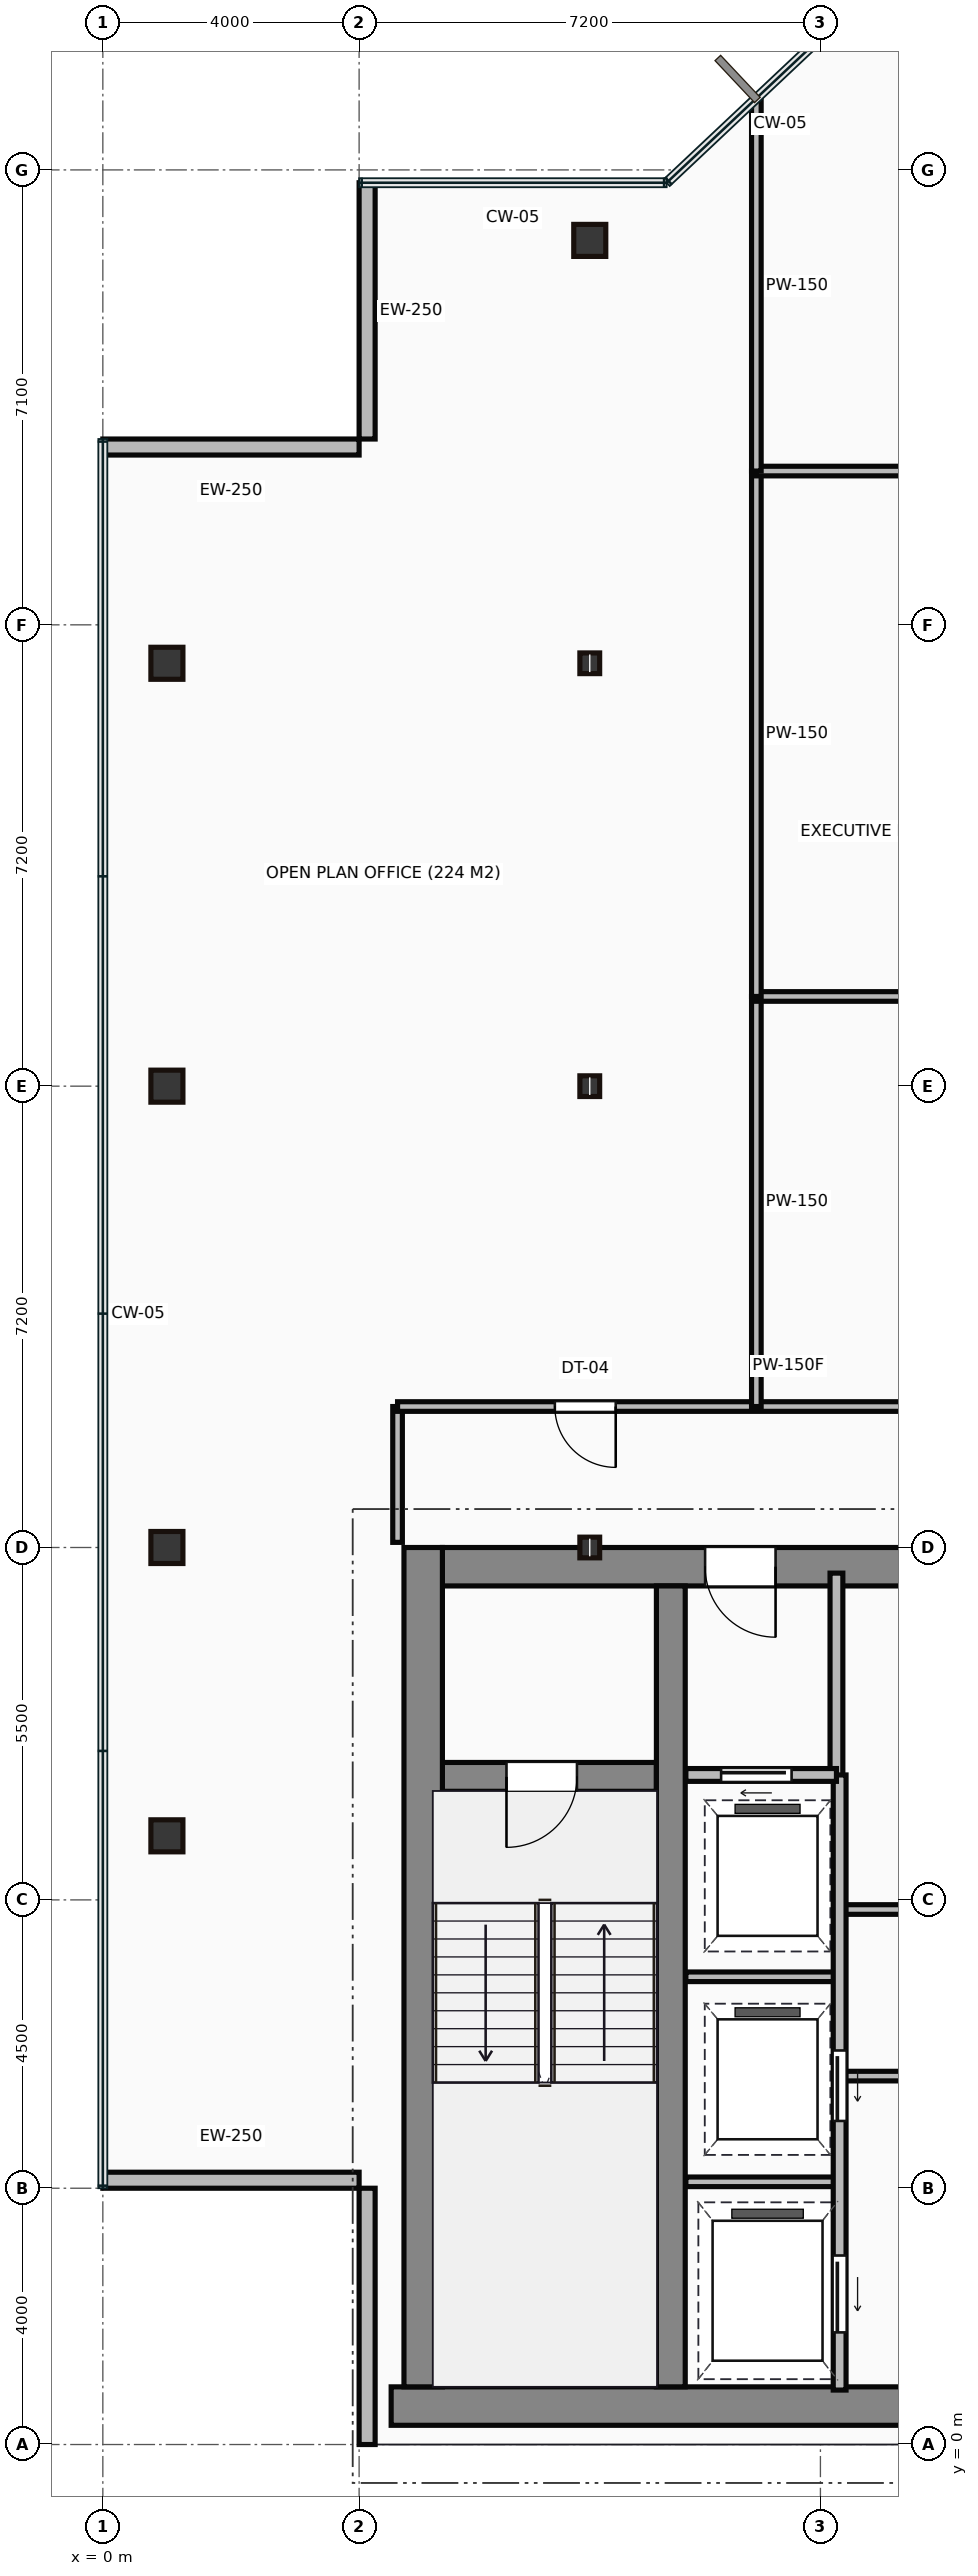
"""IFC4 building model, lengths in metres.
Left out: names, types, materials, properties, quantities, classifications, styles, units other than length and angle.
Written with IfcOpenShell. Run it as: python <this file> out.ifc"""

import sys

from ifc_helpers import new_model, si_unit, direction, frame, frame_2d, origin, origin_2d, place, context, subcontext, project, spatial, rectangle, hollow_rectangle, i_section, extrude, source, transform, mapped, element, fill, save


model = new_model("IFC4")
c1 = context("Model", 3, precision=1e-05, world=origin(), true_north=direction((0.0, 1.0)))
c2 = subcontext(c1, "Body", "Model", "MODEL_VIEW")
j1 = project(units=[si_unit("LENGTHUNIT", "METRE"), si_unit("PLANEANGLEUNIT", "RADIAN")], contexts=[c1])
p1 = place(None, origin())
s1 = spatial("IfcSite", under=j1, at=p1, CompositionType="ELEMENT")
p2 = place(p1, origin())
s2 = spatial("IfcBuilding", under=s1, at=p2, CompositionType="ELEMENT")
p3 = place(p2, frame((0.0, 0.0, 269.75)))
s3 = spatial("IfcBuildingStorey", under=s2, at=p3, CompositionType="ELEMENT", Elevation=269.75)
m1 = source(origin(), c2, "Body", "SweptSolid", [
    extrude(rectangle(XDim=29.5, YDim=0.6, at=frame_2d((14.75, 0.0))), origin(), (0.0, 0.0, 1.0), 3.65),
])
p4 = place(p3, frame((4.5, 0.6, 0.0), z_axis=(0.0, 0.0, 1.0), x_axis=(1.0, 0.0, 0.0)))
e1 = element("IfcWall", 1, at=p4, inside=s3, PredefinedType="SHEAR", context=c2, shape_type="MappedRepresentation", body=[
    mapped(m1, transform((0.0, 0.0, 0.0))),
])
m2 = source(origin(), c2, "Body", "SweptSolid", [
    extrude(rectangle(XDim=13.1, YDim=0.6, at=frame_2d((6.55, 0.0))), origin(), (0.0, 0.0, 1.0), 3.65),
])
p5 = place(p3, frame((5.0, 0.9, 0.0), z_axis=(0.0, 0.0, 1.0), x_axis=(0.0, 1.0, 0.0)))
e2 = element("IfcWall", 2, at=p5, inside=s3, PredefinedType="SHEAR", context=c2, shape_type="MappedRepresentation", body=[
    mapped(m2, transform((0.0, 0.0, 0.0))),
])
m3 = source(origin(), c2, "Body", "SweptSolid", [
    extrude(rectangle(XDim=9.1, YDim=0.6, at=frame_2d((4.55, 0.0))), origin(), (0.0, 0.0, 1.0), 3.65),
])
p6 = place(p3, frame((5.3, 13.7, 0.0), z_axis=(0.0, 0.0, 1.0), x_axis=(1.0, 0.0, 0.0)))
e3 = element("IfcWall", 3, at=p6, inside=s3, PredefinedType="SHEAR", context=c2, shape_type="MappedRepresentation", body=[
    mapped(m3, transform((0.0, 0.0, 0.0))),
])
p7 = place(p6, frame((4.1, 0.0, 0.0)))
e4 = element("IfcOpeningElement", 4, at=p7, cuts=e3, PredefinedType="OPENING", context=c2, shape_type="SweptSolid", body=[
    extrude(rectangle(XDim=1.1, YDim=2.15, at=frame_2d((0.55, 1.075))), frame((0.0, 0.31, 0.0), z_axis=(0.0, -1.0, 0.0), x_axis=(1.0, 0.0, 0.0)), (0.0, 0.0, 1.0), 0.62),
])
m4 = source(origin(), c2, "Body", "SweptSolid", [
    extrude(rectangle(XDim=12.5, YDim=0.45, at=frame_2d((6.25, 0.0))), origin(), (0.0, 0.0, 1.0), 3.65),
])
p8 = place(p3, frame((8.865, 0.9, 0.0), z_axis=(0.0, 0.0, 1.0), x_axis=(0.0, 1.0, 0.0)))
e5 = element("IfcWall", 5, at=p8, inside=s3, PredefinedType="SHEAR", context=c2, shape_type="MappedRepresentation", body=[
    mapped(m4, transform((0.0, 0.0, 0.0))),
])
m5 = source(origin(), c2, "Body", "SweptSolid", [
    extrude(rectangle(XDim=3.39, YDim=0.45, at=frame_2d((1.695, 0.0))), origin(), (0.0, 0.0, 1.0), 3.65),
])
p9 = place(p3, frame((5.25, 10.42, 0.0), z_axis=(0.0, 0.0, 1.0), x_axis=(1.0, 0.0, 0.0)))
e6 = element("IfcWall", 6, at=p9, inside=s3, PredefinedType="SHEAR", context=c2, shape_type="MappedRepresentation", body=[
    mapped(m5, transform((0.0, 0.0, 0.0))),
])
p10 = place(p9, frame((1.05, 0.0, 0.0)))
e7 = element("IfcOpeningElement", 7, at=p10, cuts=e6, PredefinedType="OPENING", context=c2, shape_type="SweptSolid", body=[
    extrude(rectangle(XDim=1.1, YDim=2.15, at=frame_2d((0.55, 1.075))), frame((0.0, 0.235, 0.0), z_axis=(0.0, -1.0, 0.0), x_axis=(1.0, 0.0, 0.0)), (0.0, 0.0, 1.0), 0.47),
])
m6 = source(origin(), c2, "Body", "SweptSolid", [
    extrude(hollow_rectangle(XDim=0.5, YDim=0.5, WallThickness=0.022, at=origin_2d()), origin(), (0.0, 0.0, 1.0), 3.65),
])
for number, where, z_axis, x_axis in (
    (8, (1.0, 9.5, 0.0), (0.0, 0.0, 1.0), (1.0, 0.0, 0.0)),
    (9, (1.0, 14.0, 0.0), (0.0, 0.0, 1.0), (1.0, 0.0, 0.0)),
    (10, (1.0, 21.2, 0.0), (0.0, 0.0, 1.0), (1.0, 0.0, 0.0)),
    (11, (1.0, 27.8, 0.0), (0.0, 0.0, 1.0), (1.0, 0.0, 0.0)),
):
    element("IfcColumn", number, at=place(p3, frame(where, z_axis=z_axis, x_axis=x_axis)), inside=s3, PredefinedType="COLUMN", context=c2, shape_type="MappedRepresentation", body=[
        mapped(m6, transform((0.0, 0.0, 0.0))),
    ])
m7 = source(origin(), c2, "Body", "SweptSolid", [
    extrude(i_section(OverallWidth=0.309, OverallDepth=0.323, WebThickness=0.014, FlangeThickness=0.023, at=origin_2d()), origin(), (0.0, 0.0, 1.0), 3.65),
])
for number, where, z_axis, x_axis in (
    (12, (7.6, 14.0, 0.0), (0.0, 0.0, 1.0), (1.0, 0.0, 0.0)),
    (13, (7.6, 21.2, 0.0), (0.0, 0.0, 1.0), (1.0, 0.0, 0.0)),
    (14, (7.6, 27.8, 0.0), (0.0, 0.0, 1.0), (1.0, 0.0, 0.0)),
):
    element("IfcColumn", number, at=place(p3, frame(where, z_axis=z_axis, x_axis=x_axis)), inside=s3, PredefinedType="COLUMN", context=c2, shape_type="MappedRepresentation", body=[
        mapped(m7, transform((0.0, 0.0, 0.0))),
    ])
p11 = place(p3, frame((7.6, 34.4, 0.0), z_axis=(0.0, 0.0, 1.0), x_axis=(1.0, 0.0, 0.0)))
e15 = element("IfcColumn", 15, at=p11, inside=s3, PredefinedType="COLUMN", context=c2, shape_type="MappedRepresentation", body=[
    mapped(m6, transform((0.0, 0.0, 0.0))),
])
m8 = source(origin(), c2, "Body", "SweptSolid", [
    extrude(rectangle(XDim=4.0, YDim=0.25, at=frame_2d((2.0, 0.0))), origin(), (0.0, 0.0, 1.0), 3.4),
])
for number, where, z_axis, x_axis in (
    (16, (4.125, 35.3, 0.0), (0.0, 0.0, 1.0), (0.0, -1.0, 0.0)),
    (17, (4.0, 31.175, 0.0), (0.0, 0.0, 1.0), (-1.0, 0.0, 0.0)),
    (18, (0.0, 4.125, 0.0), (0.0, 0.0, 1.0), (1.0, 0.0, 0.0)),
    (19, (4.125, 4.0, 0.0), (0.0, 0.0, 1.0), (0.0, -1.0, 0.0)),
):
    element("IfcWall", number, at=place(p3, frame(where, z_axis=z_axis, x_axis=x_axis)), inside=s3, PredefinedType="STANDARD", context=c2, shape_type="MappedRepresentation", body=[
        mapped(m8, transform((0.0, 0.0, 0.0))),
    ])
m9 = source(origin(), c2, "Body", "SweptSolid", [
    extrude(rectangle(XDim=3.18, YDim=0.2, at=frame_2d((1.59, 0.0))), origin(), (0.0, 0.0, 1.0), 3.4),
])
p12 = place(p3, frame((11.45, 10.42, 0.0), z_axis=(0.0, 0.0, 1.0), x_axis=(0.0, 1.0, 0.0)))
e20 = element("IfcWall", 20, at=p12, inside=s3, PredefinedType="PARTITIONING", context=c2, shape_type="MappedRepresentation", body=[
    mapped(m9, transform((0.0, 0.0, 0.0))),
])
m10 = source(origin(), c2, "Body", "SweptSolid", [
    extrude(rectangle(XDim=2.35, YDim=0.2, at=frame_2d((1.175, 0.0))), origin(), (0.0, 0.0, 1.0), 3.4),
])
p13 = place(p3, frame((9.1, 10.45, 0.0), z_axis=(0.0, 0.0, 1.0), x_axis=(1.0, 0.0, 0.0)))
e21 = element("IfcWall", 21, at=p13, inside=s3, PredefinedType="PARTITIONING", context=c2, shape_type="MappedRepresentation", body=[
    mapped(m10, transform((0.0, 0.0, 0.0))),
])
p14 = place(p13, frame((0.55, 0.0, 0.0)))
e22 = element("IfcOpeningElement", 22, at=p14, cuts=e21, PredefinedType="OPENING", context=c2, shape_type="SweptSolid", body=[
    extrude(rectangle(XDim=1.1, YDim=2.15, at=frame_2d((0.55, 1.075))), frame((0.0, 0.11, 0.0), z_axis=(0.0, -1.0, 0.0), x_axis=(1.0, 0.0, 0.0)), (0.0, 0.0, 1.0), 0.22),
])
m11 = source(origin(), c2, "Body", "SweptSolid", [
    extrude(rectangle(XDim=9.6, YDim=0.2, at=frame_2d((4.8, 0.0))), origin(), (0.0, 0.0, 1.0), 3.4),
])
p15 = place(p3, frame((11.5, 0.85, 0.0), z_axis=(0.0, 0.0, 1.0), x_axis=(0.0, 1.0, 0.0)))
e23 = element("IfcWall", 23, at=p15, inside=s3, PredefinedType="PARTITIONING", context=c2, shape_type="MappedRepresentation", body=[
    mapped(m11, transform((0.0, 0.0, 0.0))),
])
p16 = place(p15, frame((4.2, 0.0, 0.0)))
e24 = element("IfcOpeningElement", 24, at=p16, cuts=e23, PredefinedType="OPENING", context=c2, shape_type="SweptSolid", body=[
    extrude(rectangle(XDim=1.1, YDim=2.15, at=frame_2d((0.55, 1.075))), frame((0.0, 0.11, 0.0), z_axis=(0.0, -1.0, 0.0), x_axis=(1.0, 0.0, 0.0)), (0.0, 0.0, 1.0), 0.22),
])
p17 = place(p15, frame((0.9, 0.0, 0.0)))
e25 = element("IfcOpeningElement", 25, at=p17, cuts=e23, PredefinedType="OPENING", context=c2, shape_type="SweptSolid", body=[
    extrude(rectangle(XDim=1.2, YDim=2.15, at=frame_2d((0.6, 1.075))), frame((0.0, 0.11, 0.0), z_axis=(0.0, -1.0, 0.0), x_axis=(1.0, 0.0, 0.0)), (0.0, 0.0, 1.0), 0.22),
])
m12 = source(origin(), c2, "Body", "SweptSolid", [
    extrude(rectangle(XDim=2.4, YDim=0.15, at=frame_2d((1.2, 0.0))), origin(), (0.0, 0.0, 1.0), 3.4),
])
for number, where, z_axis, x_axis in (
    (26, (9.1, 4.1, 0.0), (0.0, 0.0, 1.0), (1.0, 0.0, 0.0)),
    (27, (9.1, 7.3, 0.0), (0.0, 0.0, 1.0), (1.0, 0.0, 0.0)),
):
    element("IfcWall", number, at=place(p3, frame(where, z_axis=z_axis, x_axis=x_axis)), inside=s3, PredefinedType="PARTITIONING", context=c2, shape_type="MappedRepresentation", body=[
        mapped(m12, transform((0.0, 0.0, 0.0))),
    ])
m13 = source(origin(), c2, "Body", "SweptSolid", [
    extrude(rectangle(XDim=11.85, YDim=0.15, at=frame_2d((5.925, 0.0))), origin(), (0.0, 0.0, 1.0), 3.4),
])
p18 = place(p3, frame((11.55, 5.75, 0.0), z_axis=(0.0, 0.0, 1.0), x_axis=(1.0, 0.0, 0.0)))
e28 = element("IfcWall", 28, at=p18, inside=s3, PredefinedType="PARTITIONING", context=c2, shape_type="MappedRepresentation", body=[
    mapped(m13, transform((0.0, 0.0, 0.0))),
])
p19 = place(p3, frame((11.55, 8.35, 0.0), z_axis=(0.0, 0.0, 1.0), x_axis=(1.0, 0.0, 0.0)))
e29 = element("IfcWall", 29, at=p19, inside=s3, PredefinedType="PARTITIONING", context=c2, shape_type="MappedRepresentation", body=[
    mapped(m13, transform((0.0, 0.0, 0.0))),
])
p20 = place(p19, frame((1.1, 0.0, 0.0)))
e30 = element("IfcOpeningElement", 30, at=p20, cuts=e29, PredefinedType="OPENING", context=c2, shape_type="SweptSolid", body=[
    extrude(rectangle(XDim=0.95, YDim=2.15, at=frame_2d((0.475, 1.075))), frame((0.0, 0.085, 0.0), z_axis=(0.0, -1.0, 0.0), x_axis=(1.0, 0.0, 0.0)), (0.0, 0.0, 1.0), 0.17),
])
p21 = place(p19, frame((9.4, 0.0, 0.0)))
e31 = element("IfcOpeningElement", 31, at=p21, cuts=e29, PredefinedType="OPENING", context=c2, shape_type="SweptSolid", body=[
    extrude(rectangle(XDim=0.95, YDim=2.15, at=frame_2d((0.475, 1.075))), frame((0.0, 0.085, 0.0), z_axis=(0.0, -1.0, 0.0), x_axis=(1.0, 0.0, 0.0)), (0.0, 0.0, 1.0), 0.17),
])
m14 = source(origin(), c2, "Body", "SweptSolid", [
    extrude(rectangle(XDim=2.12, YDim=0.15, at=frame_2d((1.06, 0.0))), origin(), (0.0, 0.0, 1.0), 3.4),
])
p22 = place(p3, frame((4.6, 14.08, 0.0), z_axis=(0.0, 0.0, 1.0), x_axis=(0.0, 1.0, 0.0)))
e32 = element("IfcWall", 32, at=p22, inside=s3, PredefinedType="PARTITIONING", context=c2, shape_type="MappedRepresentation", body=[
    mapped(m14, transform((0.0, 0.0, 0.0))),
])
m15 = source(origin(), c2, "Body", "SweptSolid", [
    extrude(rectangle(XDim=12.2, YDim=0.15, at=frame_2d((6.1, 0.0))), origin(), (0.0, 0.0, 1.0), 3.4),
])
p23 = place(p3, frame((4.6, 16.2, 0.0), z_axis=(0.0, 0.0, 1.0), x_axis=(1.0, 0.0, 0.0)))
e33 = element("IfcWall", 33, at=p23, inside=s3, PredefinedType="PARTITIONING", context=c2, shape_type="MappedRepresentation", body=[
    mapped(m15, transform((0.0, 0.0, 0.0))),
])
p24 = place(p23, frame((2.455, 0.0, 0.0)))
e34 = element("IfcOpeningElement", 34, at=p24, cuts=e33, PredefinedType="OPENING", context=c2, shape_type="SweptSolid", body=[
    extrude(rectangle(XDim=0.95, YDim=2.15, at=frame_2d((0.475, 1.075))), frame((0.0, 0.085, 0.0), z_axis=(0.0, -1.0, 0.0), x_axis=(1.0, 0.0, 0.0)), (0.0, 0.0, 1.0), 0.17),
])
p25 = place(p23, frame((8.295, 0.0, 0.0)))
e35 = element("IfcOpeningElement", 35, at=p25, cuts=e33, PredefinedType="OPENING", context=c2, shape_type="SweptSolid", body=[
    extrude(rectangle(XDim=0.95, YDim=2.15, at=frame_2d((0.475, 1.075))), frame((0.0, 0.085, 0.0), z_axis=(0.0, -1.0, 0.0), x_axis=(1.0, 0.0, 0.0)), (0.0, 0.0, 1.0), 0.17),
])
m16 = source(origin(), c2, "Body", "SweptSolid", [
    extrude(rectangle(XDim=6.4, YDim=0.15, at=frame_2d((3.2, 0.0))), origin(), (0.0, 0.0, 1.0), 3.4),
])
p26 = place(p3, frame((10.2, 22.6, 0.0), z_axis=(0.0, 0.0, 1.0), x_axis=(0.0, -1.0, 0.0)))
e36 = element("IfcWall", 36, at=p26, inside=s3, PredefinedType="PARTITIONING", context=c2, shape_type="MappedRepresentation", body=[
    mapped(m16, transform((0.0, 0.0, 0.0))),
])
m17 = source(origin(), c2, "Body", "SweptSolid", [
    extrude(rectangle(XDim=6.6, YDim=0.15, at=frame_2d((3.3, 0.0))), origin(), (0.0, 0.0, 1.0), 3.4),
])
p27 = place(p3, frame((10.2, 22.6, 0.0), z_axis=(0.0, 0.0, 1.0), x_axis=(1.0, 0.0, 0.0)))
e37 = element("IfcWall", 37, at=p27, inside=s3, PredefinedType="PARTITIONING", context=c2, shape_type="MappedRepresentation", body=[
    mapped(m17, transform((0.0, 0.0, 0.0))),
])
m18 = source(origin(), c2, "Body", "SweptSolid", [
    extrude(rectangle(XDim=8.2, YDim=0.15, at=frame_2d((4.1, 0.0))), origin(), (0.0, 0.0, 1.0), 3.4),
])
p28 = place(p3, frame((10.2, 30.8, 0.0), z_axis=(0.0, 0.0, 1.0), x_axis=(0.0, -1.0, 0.0)))
e38 = element("IfcWall", 38, at=p28, inside=s3, PredefinedType="PARTITIONING", context=c2, shape_type="MappedRepresentation", body=[
    mapped(m18, transform((0.0, 0.0, 0.0))),
])
p29 = place(p3, frame((10.2, 30.8, 0.0), z_axis=(0.0, 0.0, 1.0), x_axis=(1.0, 0.0, 0.0)))
e39 = element("IfcWall", 39, at=p29, inside=s3, PredefinedType="PARTITIONING", context=c2, shape_type="MappedRepresentation", body=[
    mapped(m17, transform((0.0, 0.0, 0.0))),
])
m19 = source(origin(), c2, "Body", "SweptSolid", [
    extrude(rectangle(XDim=5.79, YDim=0.15, at=frame_2d((2.895, 0.0))), origin(), (0.0, 0.0, 1.0), 3.4),
])
p30 = place(p3, frame((10.2, 36.59, 0.0), z_axis=(0.0, 0.0, 1.0), x_axis=(0.0, -1.0, 0.0)))
e40 = element("IfcWall", 40, at=p30, inside=s3, PredefinedType="PARTITIONING", context=c2, shape_type="MappedRepresentation", body=[
    mapped(m19, transform((0.0, 0.0, 0.0))),
])
m20 = source(origin(), c2, "Body", "SweptSolid", [
    extrude(rectangle(XDim=1.1, YDim=2.15, at=frame_2d((0.55, 1.075))), frame((0.0, 0.025, 0.0), z_axis=(0.0, -1.0, 0.0), x_axis=(1.0, 0.0, 0.0)), (0.0, 0.0, 1.0), 0.05),
])
p31 = place(p10, frame((1.1, 0.0, 0.0), z_axis=(0.0, 0.0, 1.0), x_axis=(-1.0, 0.0, 0.0)))
e41 = element("IfcDoor", 41, at=p31, inside=s3, OperationType="SINGLE_SWING_LEFT", PredefinedType="DOOR", context=c2, shape_type="MappedRepresentation", body=[
    mapped(m20, transform((0.0, 0.0, 0.0))),
])
fill(e7, e41)
p32 = place(p7, origin())
e42 = element("IfcDoor", 42, at=p32, inside=s3, OperationType="SINGLE_SWING_RIGHT", PredefinedType="DOOR", context=c2, shape_type="MappedRepresentation", body=[
    mapped(m20, transform((0.0, 0.0, 0.0))),
])
fill(e4, e42)
p33 = place(p14, origin())
e43 = element("IfcDoor", 43, at=p33, inside=s3, OperationType="SLIDING_TO_LEFT", PredefinedType="DOOR", context=c2, shape_type="MappedRepresentation", body=[
    mapped(m20, transform((0.0, 0.0, 0.0))),
])
fill(e22, e43)
p34 = place(p16, frame((1.1, 0.0, 0.0), z_axis=(0.0, 0.0, 1.0), x_axis=(-1.0, 0.0, 0.0)))
e44 = element("IfcDoor", 44, at=p34, inside=s3, OperationType="SLIDING_TO_LEFT", PredefinedType="DOOR", context=c2, shape_type="MappedRepresentation", body=[
    mapped(m20, transform((0.0, 0.0, 0.0))),
])
fill(e24, e44)
m21 = source(origin(), c2, "Body", "SweptSolid", [
    extrude(rectangle(XDim=1.2, YDim=2.15, at=frame_2d((0.6, 1.075))), frame((0.0, 0.025, 0.0), z_axis=(0.0, -1.0, 0.0), x_axis=(1.0, 0.0, 0.0)), (0.0, 0.0, 1.0), 0.05),
])
p35 = place(p17, frame((1.2, 0.0, 0.0), z_axis=(0.0, 0.0, 1.0), x_axis=(-1.0, 0.0, 0.0)))
e45 = element("IfcDoor", 45, at=p35, inside=s3, OperationType="SLIDING_TO_LEFT", PredefinedType="DOOR", context=c2, shape_type="MappedRepresentation", body=[
    mapped(m21, transform((0.0, 0.0, 0.0))),
])
fill(e25, e45)
m22 = source(origin(), c2, "Body", "SweptSolid", [
    extrude(rectangle(XDim=0.95, YDim=2.15, at=frame_2d((0.475, 1.075))), frame((0.0, 0.025, 0.0), z_axis=(0.0, -1.0, 0.0), x_axis=(1.0, 0.0, 0.0)), (0.0, 0.0, 1.0), 0.05),
])
p36 = place(p24, origin())
e46 = element("IfcDoor", 46, at=p36, inside=s3, OperationType="SINGLE_SWING_RIGHT", PredefinedType="DOOR", context=c2, shape_type="MappedRepresentation", body=[
    mapped(m22, transform((0.0, 0.0, 0.0))),
])
fill(e34, e46)
save(model, sys.argv[1])
